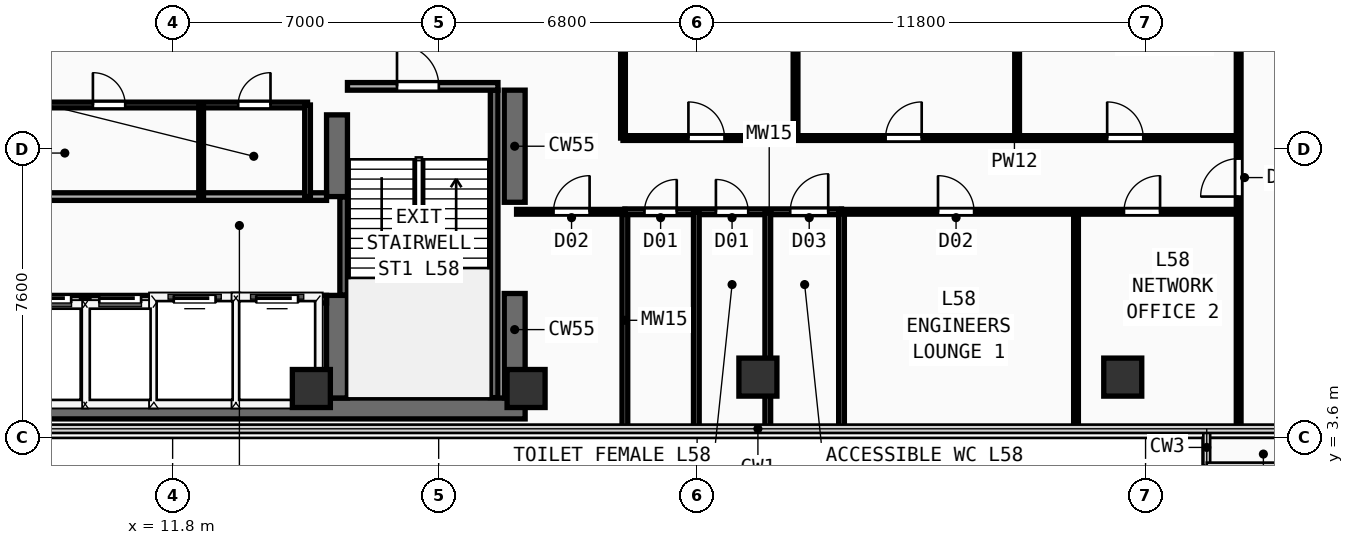
"""IFC4 building model, lengths in metres.
Left out: names, types, materials, properties, quantities, classifications, styles, units other than length and angle.
Written with IfcOpenShell. Run it as: python <this file> out.ifc"""

import sys

from ifc_helpers import new_model, si_unit, direction, frame, frame_2d, origin, origin_2d, place, context, subcontext, project, spatial, rectangle, extrude, element, fill, save


model = new_model("IFC4")
c1 = context("Model", 3, precision=1e-05, world=origin(), true_north=direction((0.0, 1.0)))
c2 = subcontext(c1, "Body", "Model", "MODEL_VIEW")
j1 = project(units=[si_unit("LENGTHUNIT", "METRE"), si_unit("PLANEANGLEUNIT", "RADIAN")], contexts=[c1])
p1 = place(None, origin())
s1 = spatial("IfcSite", under=j1, at=p1, CompositionType="ELEMENT")
p2 = place(p1, origin())
s2 = spatial("IfcBuilding", under=s1, at=p2, CompositionType="ELEMENT")
p3 = place(p2, frame((0.0, 0.0, 227.3)))
s3 = spatial("IfcBuildingStorey", under=s2, at=p3, CompositionType="ELEMENT", Elevation=227.3)
p4 = place(p3, frame((7.175, 4.375, 0.0), z_axis=(0.0, 0.0, 1.0), x_axis=(1.0, 0.0, 0.0)))
e1 = element("IfcWall", 1, at=p4, inside=s3, PredefinedType="SHEAR", context=c2, shape_type="SweptSolid", body=[
    extrude(rectangle(XDim=13.9, YDim=0.55, at=frame_2d((6.95, 0.0))), origin(), (0.0, 0.0, 1.0), 3.56),
])
p5 = place(p3, frame((20.8, 4.65, 0.0), z_axis=(0.0, 0.0, 1.0), x_axis=(0.0, 1.0, 0.0)))
e2 = element("IfcWall", 2, at=p5, inside=s3, PredefinedType="SHEAR", context=c2, shape_type="SweptSolid", body=[
    extrude(rectangle(XDim=2.75, YDim=0.55, at=frame_2d((1.375, 0.0))), origin(), (0.0, 0.0, 1.0), 3.56),
])
p6 = place(p3, frame((20.8, 9.8, 0.0), z_axis=(0.0, 0.0, 1.0), x_axis=(0.0, 1.0, 0.0)))
e3 = element("IfcWall", 3, at=p6, inside=s3, PredefinedType="SHEAR", context=c2, shape_type="SweptSolid", body=[
    extrude(rectangle(XDim=2.95, YDim=0.55, at=frame_2d((1.475, 0.0))), origin(), (0.0, 0.0, 1.0), 3.56),
])
p7 = place(p3, frame((16.125, 4.65, 0.0), z_axis=(0.0, 0.0, 1.0), x_axis=(0.0, 1.0, 0.0)))
e4 = element("IfcWall", 4, at=p7, inside=s3, PredefinedType="SHEAR", context=c2, shape_type="SweptSolid", body=[
    extrude(rectangle(XDim=2.7, YDim=0.55, at=frame_2d((1.35, 0.0))), origin(), (0.0, 0.0, 1.0), 3.56),
])
p8 = place(p3, frame((16.125, 9.95, 0.0), z_axis=(0.0, 0.0, 1.0), x_axis=(0.0, 1.0, 0.0)))
e5 = element("IfcWall", 5, at=p8, inside=s3, PredefinedType="SHEAR", context=c2, shape_type="SweptSolid", body=[
    extrude(rectangle(XDim=2.15, YDim=0.55, at=frame_2d((1.075, 0.0))), origin(), (0.0, 0.0, 1.0), 3.56),
])
for number, where, z_axis, x_axis in (
    (6, (15.45, 4.9, 0.0), (0.0, 0.0, 1.0), (1.0, 0.0, 0.0)),
    (7, (21.1, 4.9, 0.0), (0.0, 0.0, 1.0), (1.0, 0.0, 0.0)),
    (8, (27.2, 5.2, 0.0), (0.0, 0.0, 1.0), (1.0, 0.0, 0.0)),
    (9, (36.8, 5.2, 0.0), (0.0, 0.0, 1.0), (1.0, 0.0, 0.0)),
):
    element("IfcColumn", number, at=place(p3, frame(where, z_axis=z_axis, x_axis=x_axis)), inside=s3, PredefinedType="COLUMN", context=c2, shape_type="SweptSolid", body=[
        extrude(rectangle(XDim=1.0, YDim=1.0, at=origin_2d()), origin(), (0.0, 0.0, 1.0), 3.56),
    ])
p9 = place(p3, frame((16.3, 7.36, 0.0), z_axis=(0.0, 0.0, 1.0), x_axis=(0.0, 1.0, 0.0)))
e10 = element("IfcWall", 10, at=p9, inside=s3, PredefinedType="SHEAR", context=c2, shape_type="SweptSolid", body=[
    extrude(rectangle(XDim=2.58, YDim=0.2, at=frame_2d((1.29, 0.0))), origin(), (0.0, 0.0, 1.0), 3.56),
])
p10 = place(p3, frame((20.26, 4.66, 0.0), z_axis=(0.0, 0.0, 1.0), x_axis=(0.0, 1.0, 0.0)))
e11 = element("IfcWall", 11, at=p10, inside=s3, PredefinedType="SHEAR", context=c2, shape_type="SweptSolid", body=[
    extrude(rectangle(XDim=8.09, YDim=0.2, at=frame_2d((4.045, 0.0))), origin(), (0.0, 0.0, 1.0), 3.56),
])
p11 = place(p3, frame((16.4, 12.85, 0.0), z_axis=(0.0, 0.0, 1.0), x_axis=(1.0, 0.0, 0.0)))
e12 = element("IfcWall", 12, at=p11, inside=s3, PredefinedType="PARTITIONING", context=c2, shape_type="SweptSolid", body=[
    extrude(rectangle(XDim=3.96, YDim=0.2, at=frame_2d((1.98, 0.0))), origin(), (0.0, 0.0, 1.0), 3.56),
])
p12 = place(p11, frame((1.304, 0.0, 0.0)))
e13 = element("IfcOpeningElement", 13, at=p12, cuts=e12, PredefinedType="OPENING", context=c2, shape_type="SweptSolid", body=[
    extrude(rectangle(XDim=1.1, YDim=2.2, at=frame_2d((0.55, 1.1))), frame((0.0, 0.11, 0.0), z_axis=(0.0, -1.0, 0.0), x_axis=(1.0, 0.0, 0.0)), (0.0, 0.0, 1.0), 0.22),
])
p13 = place(p3, frame((7.5, 7.25, 0.0), z_axis=(0.0, 0.0, 1.0), x_axis=(1.0, 0.0, 0.0)))
e14 = element("IfcWall", 14, at=p13, inside=s3, PredefinedType="PARTITIONING", context=c2, shape_type="SweptSolid", body=[
    extrude(rectangle(XDim=8.35, YDim=0.2, at=frame_2d((4.175, 0.0))), origin(), (0.0, 0.0, 1.0), 3.56),
])
p14 = place(p13, frame((0.53, 0.0, 0.0)))
e15 = element("IfcOpeningElement", 15, at=p14, cuts=e14, PredefinedType="OPENING", context=c2, shape_type="SweptSolid", body=[
    extrude(rectangle(XDim=1.1, YDim=2.2, at=frame_2d((0.55, 1.1))), frame((0.0, 0.11, 0.0), z_axis=(0.0, -1.0, 0.0), x_axis=(1.0, 0.0, 0.0)), (0.0, 0.0, 1.0), 0.22),
])
p15 = place(p13, frame((2.37, 0.0, 0.0)))
e16 = element("IfcOpeningElement", 16, at=p15, cuts=e14, PredefinedType="OPENING", context=c2, shape_type="SweptSolid", body=[
    extrude(rectangle(XDim=1.1, YDim=2.2, at=frame_2d((0.55, 1.1))), frame((0.0, 0.11, 0.0), z_axis=(0.0, -1.0, 0.0), x_axis=(1.0, 0.0, 0.0)), (0.0, 0.0, 1.0), 0.22),
])
p16 = place(p13, frame((4.33, 0.0, 0.0)))
e17 = element("IfcOpeningElement", 17, at=p16, cuts=e14, PredefinedType="OPENING", context=c2, shape_type="SweptSolid", body=[
    extrude(rectangle(XDim=1.1, YDim=2.2, at=frame_2d((0.55, 1.1))), frame((0.0, 0.11, 0.0), z_axis=(0.0, -1.0, 0.0), x_axis=(1.0, 0.0, 0.0)), (0.0, 0.0, 1.0), 0.22),
])
p17 = place(p13, frame((6.5, 0.0, 0.0)))
e18 = element("IfcOpeningElement", 18, at=p17, cuts=e14, PredefinedType="OPENING", context=c2, shape_type="SweptSolid", body=[
    extrude(rectangle(XDim=1.1, YDim=2.2, at=frame_2d((0.55, 1.1))), frame((0.0, 0.11, 0.0), z_axis=(0.0, -1.0, 0.0), x_axis=(1.0, 0.0, 0.0)), (0.0, 0.0, 1.0), 0.22),
])
p18 = place(p3, frame((7.5, 9.95, 0.0), z_axis=(0.0, 0.0, 1.0), x_axis=(1.0, 0.0, 0.0)))
e19 = element("IfcWall", 19, at=p18, inside=s3, PredefinedType="PARTITIONING", context=c2, shape_type="SweptSolid", body=[
    extrude(rectangle(XDim=8.35, YDim=0.2, at=frame_2d((4.175, 0.0))), origin(), (0.0, 0.0, 1.0), 3.56),
])
for number, where, z_axis, x_axis in (
    (20, (9.5, 4.45, 0.0), (0.0, 0.0, 1.0), (0.0, 1.0, 0.0)),
    (21, (11.36, 4.45, 0.0), (0.0, 0.0, 1.0), (0.0, 1.0, 0.0)),
    (22, (13.46, 4.45, 0.0), (0.0, 0.0, 1.0), (0.0, 1.0, 0.0)),
):
    element("IfcWall", number, at=place(p3, frame(where, z_axis=z_axis, x_axis=x_axis)), inside=s3, PredefinedType="PARTITIONING", context=c2, shape_type="SweptSolid", body=[
        extrude(rectangle(XDim=2.8, YDim=0.2, at=frame_2d((1.4, 0.0))), origin(), (0.0, 0.0, 1.0), 3.56),
    ])
p19 = place(p3, frame((7.5, 12.36, 0.0), z_axis=(0.0, 0.0, 1.0), x_axis=(1.0, 0.0, 0.0)))
e23 = element("IfcWall", 23, at=p19, inside=s3, PredefinedType="PARTITIONING", context=c2, shape_type="SweptSolid", body=[
    extrude(rectangle(XDim=7.85, YDim=0.15, at=frame_2d((3.925, 0.0))), origin(), (0.0, 0.0, 1.0), 3.56),
])
p20 = place(p19, frame((2.202, 0.0, 0.0)))
e24 = element("IfcOpeningElement", 24, at=p20, cuts=e23, PredefinedType="OPENING", context=c2, shape_type="SweptSolid", body=[
    extrude(rectangle(XDim=0.85, YDim=2.15, at=frame_2d((0.425, 1.075))), frame((0.0, 0.085, 0.0), z_axis=(0.0, -1.0, 0.0), x_axis=(1.0, 0.0, 0.0)), (0.0, 0.0, 1.0), 0.17),
])
p21 = place(p19, frame((6.025, 0.0, 0.0)))
e25 = element("IfcOpeningElement", 25, at=p21, cuts=e23, PredefinedType="OPENING", context=c2, shape_type="SweptSolid", body=[
    extrude(rectangle(XDim=0.85, YDim=2.15, at=frame_2d((0.425, 1.075))), frame((0.0, 0.085, 0.0), z_axis=(0.0, -1.0, 0.0), x_axis=(1.0, 0.0, 0.0)), (0.0, 0.0, 1.0), 0.17),
])
p22 = place(p3, frame((15.35, 9.95, 0.0), z_axis=(0.0, 0.0, 1.0), x_axis=(0.0, 1.0, 0.0)))
e26 = element("IfcWall", 26, at=p22, inside=s3, PredefinedType="PARTITIONING", context=c2, shape_type="SweptSolid", body=[
    extrude(rectangle(XDim=2.41, YDim=0.15, at=frame_2d((1.205, 0.0))), origin(), (0.0, 0.0, 1.0), 3.56),
])
p23 = place(p3, frame((12.55, 9.95, 0.0), z_axis=(0.0, 0.0, 1.0), x_axis=(0.0, 1.0, 0.0)))
e27 = element("IfcWall", 27, at=p23, inside=s3, PredefinedType="PARTITIONING", context=c2, shape_type="SweptSolid", body=[
    extrude(rectangle(XDim=2.41, YDim=0.125, at=frame_2d((1.205, 0.0))), origin(), (0.0, 0.0, 1.0), 3.56),
])
p24 = place(p3, frame((23.7, 3.84, 0.0), z_axis=(0.0, 0.0, 1.0), x_axis=(0.0, 1.0, 0.0)))
e28 = element("IfcWall", 28, at=p24, inside=s3, PredefinedType="PLUMBINGWALL", context=c2, shape_type="SweptSolid", body=[
    extrude(rectangle(XDim=5.71, YDim=0.15, at=frame_2d((2.855, 0.0))), origin(), (0.0, 0.0, 1.0), 3.56),
])
p25 = place(p3, frame((23.7, 9.55, 0.0), z_axis=(0.0, 0.0, 1.0), x_axis=(1.0, 0.0, 0.0)))
e29 = element("IfcWall", 29, at=p25, inside=s3, PredefinedType="PLUMBINGWALL", context=c2, shape_type="SweptSolid", body=[
    extrude(rectangle(XDim=5.7, YDim=0.15, at=frame_2d((2.85, 0.0))), origin(), (0.0, 0.0, 1.0), 3.2),
])
p26 = place(p25, frame((0.515, 0.0, 0.0)))
e30 = element("IfcOpeningElement", 30, at=p26, cuts=e29, PredefinedType="OPENING", context=c2, shape_type="SweptSolid", body=[
    extrude(rectangle(XDim=0.85, YDim=2.15, at=frame_2d((0.425, 1.075))), frame((0.0, 0.085, 0.0), z_axis=(0.0, -1.0, 0.0), x_axis=(1.0, 0.0, 0.0)), (0.0, 0.0, 1.0), 0.17),
])
p27 = place(p25, frame((2.395, 0.0, 0.0)))
e31 = element("IfcOpeningElement", 31, at=p27, cuts=e29, PredefinedType="OPENING", context=c2, shape_type="SweptSolid", body=[
    extrude(rectangle(XDim=0.85, YDim=2.15, at=frame_2d((0.425, 1.075))), frame((0.0, 0.085, 0.0), z_axis=(0.0, -1.0, 0.0), x_axis=(1.0, 0.0, 0.0)), (0.0, 0.0, 1.0), 0.17),
])
p28 = place(p25, frame((4.35, 0.0, 0.0)))
e32 = element("IfcOpeningElement", 32, at=p28, cuts=e29, PredefinedType="OPENING", context=c2, shape_type="SweptSolid", body=[
    extrude(rectangle(XDim=1.0, YDim=2.2, at=frame_2d((0.5, 1.1))), frame((0.0, 0.085, 0.0), z_axis=(0.0, -1.0, 0.0), x_axis=(1.0, 0.0, 0.0)), (0.0, 0.0, 1.0), 0.17),
])
p29 = place(p3, frame((25.58, 3.84, 0.0), z_axis=(0.0, 0.0, 1.0), x_axis=(0.0, 1.0, 0.0)))
e33 = element("IfcWall", 33, at=p29, inside=s3, PredefinedType="PLUMBINGWALL", context=c2, shape_type="SweptSolid", body=[
    extrude(rectangle(XDim=5.71, YDim=0.15, at=frame_2d((2.855, 0.0))), origin(), (0.0, 0.0, 1.0), 3.56),
])
p30 = place(p3, frame((27.46, 3.84, 0.0), z_axis=(0.0, 0.0, 1.0), x_axis=(0.0, 1.0, 0.0)))
e34 = element("IfcWall", 34, at=p30, inside=s3, PredefinedType="PLUMBINGWALL", context=c2, shape_type="SweptSolid", body=[
    extrude(rectangle(XDim=5.71, YDim=0.15, at=frame_2d((2.855, 0.0))), origin(), (0.0, 0.0, 1.0), 3.16),
])
p31 = place(p3, frame((29.4, 3.84, 0.0), z_axis=(0.0, 0.0, 1.0), x_axis=(0.0, 1.0, 0.0)))
e35 = element("IfcWall", 35, at=p31, inside=s3, PredefinedType="PLUMBINGWALL", context=c2, shape_type="SweptSolid", body=[
    extrude(rectangle(XDim=5.71, YDim=0.15, at=frame_2d((2.855, 0.0))), origin(), (0.0, 0.0, 1.0), 3.56),
])
p32 = place(p3, frame((20.85, 9.55, 0.0), z_axis=(0.0, 0.0, 1.0), x_axis=(1.0, 0.0, 0.0)))
e36 = element("IfcWall", 36, at=p32, inside=s3, PredefinedType="PARTITIONING", context=c2, shape_type="SweptSolid", body=[
    extrude(rectangle(XDim=2.85, YDim=0.125, at=frame_2d((1.425, 0.0))), origin(), (0.0, 0.0, 1.0), 3.2),
])
p33 = place(p32, frame((0.971, 0.0, 0.0)))
e37 = element("IfcOpeningElement", 37, at=p33, cuts=e36, PredefinedType="OPENING", context=c2, shape_type="SweptSolid", body=[
    extrude(rectangle(XDim=0.95, YDim=2.15, at=frame_2d((0.475, 1.075))), frame((0.0, 0.073, 0.0), z_axis=(0.0, -1.0, 0.0), x_axis=(1.0, 0.0, 0.0)), (0.0, 0.0, 1.0), 0.145),
])
p34 = place(p3, frame((29.4, 9.55, 0.0), z_axis=(0.0, 0.0, 1.0), x_axis=(1.0, 0.0, 0.0)))
e38 = element("IfcWall", 38, at=p34, inside=s3, PredefinedType="PARTITIONING", context=c2, shape_type="SweptSolid", body=[
    extrude(rectangle(XDim=10.45, YDim=0.125, at=frame_2d((5.225, 0.0))), origin(), (0.0, 0.0, 1.0), 3.2),
])
p35 = place(p34, frame((2.539, 0.0, 0.0)))
e39 = element("IfcOpeningElement", 39, at=p35, cuts=e38, PredefinedType="OPENING", context=c2, shape_type="SweptSolid", body=[
    extrude(rectangle(XDim=0.95, YDim=2.15, at=frame_2d((0.475, 1.075))), frame((0.0, 0.073, 0.0), z_axis=(0.0, -1.0, 0.0), x_axis=(1.0, 0.0, 0.0)), (0.0, 0.0, 1.0), 0.145),
])
p36 = place(p34, frame((7.432, 0.0, 0.0)))
e40 = element("IfcOpeningElement", 40, at=p36, cuts=e38, PredefinedType="OPENING", context=c2, shape_type="SweptSolid", body=[
    extrude(rectangle(XDim=0.95, YDim=2.15, at=frame_2d((0.475, 1.075))), frame((0.0, 0.073, 0.0), z_axis=(0.0, -1.0, 0.0), x_axis=(1.0, 0.0, 0.0)), (0.0, 0.0, 1.0), 0.145),
])
p37 = place(p3, frame((35.57, 3.84, 0.0), z_axis=(0.0, 0.0, 1.0), x_axis=(0.0, 1.0, 0.0)))
e41 = element("IfcWall", 41, at=p37, inside=s3, PredefinedType="PARTITIONING", context=c2, shape_type="SweptSolid", body=[
    extrude(rectangle(XDim=5.71, YDim=0.125, at=frame_2d((2.855, 0.0))), origin(), (0.0, 0.0, 1.0), 3.56),
])
p38 = place(p3, frame((39.85, 3.84, 0.0), z_axis=(0.0, 0.0, 1.0), x_axis=(0.0, 1.0, 0.0)))
e42 = element("IfcWall", 42, at=p38, inside=s3, PredefinedType="PARTITIONING", context=c2, shape_type="SweptSolid", body=[
    extrude(rectangle(XDim=15.92, YDim=0.125, at=frame_2d((7.96, 0.0))), origin(), (0.0, 0.0, 1.0), 3.56),
])
p39 = place(p38, frame((6.11, 0.0, 0.0)))
e43 = element("IfcOpeningElement", 43, at=p39, cuts=e42, PredefinedType="OPENING", context=c2, shape_type="SweptSolid", body=[
    extrude(rectangle(XDim=1.0, YDim=2.2, at=frame_2d((0.5, 1.1))), frame((0.0, 0.073, 0.0), z_axis=(0.0, -1.0, 0.0), x_axis=(1.0, 0.0, 0.0)), (0.0, 0.0, 1.0), 0.145),
])
p40 = place(p3, frame((23.65, 11.49, 0.0), z_axis=(0.0, 0.0, 1.0), x_axis=(0.0, 1.0, 0.0)))
e44 = element("IfcWall", 44, at=p40, inside=s3, PredefinedType="PARTITIONING", context=c2, shape_type="SweptSolid", body=[
    extrude(rectangle(XDim=12.42, YDim=0.125, at=frame_2d((6.21, 0.0))), origin(), (0.0, 0.0, 1.0), 3.56),
])
p41 = place(p3, frame((23.65, 11.49, 0.0), z_axis=(0.0, 0.0, 1.0), x_axis=(1.0, 0.0, 0.0)))
e45 = element("IfcWall", 45, at=p41, inside=s3, PredefinedType="PARTITIONING", context=c2, shape_type="SweptSolid", body=[
    extrude(rectangle(XDim=16.2, YDim=0.125, at=frame_2d((8.1, 0.0))), origin(), (0.0, 0.0, 1.0), 3.56),
])
p42 = place(p41, frame((1.722, 0.0, 0.0)))
e46 = element("IfcOpeningElement", 46, at=p42, cuts=e45, PredefinedType="OPENING", context=c2, shape_type="SweptSolid", body=[
    extrude(rectangle(XDim=0.95, YDim=2.15, at=frame_2d((0.475, 1.075))), frame((0.0, 0.073, 0.0), z_axis=(0.0, -1.0, 0.0), x_axis=(1.0, 0.0, 0.0)), (0.0, 0.0, 1.0), 0.145),
])
p43 = place(p41, frame((6.91, 0.0, 0.0)))
e47 = element("IfcOpeningElement", 47, at=p43, cuts=e45, PredefinedType="OPENING", context=c2, shape_type="SweptSolid", body=[
    extrude(rectangle(XDim=0.95, YDim=2.15, at=frame_2d((0.475, 1.075))), frame((0.0, 0.073, 0.0), z_axis=(0.0, -1.0, 0.0), x_axis=(1.0, 0.0, 0.0)), (0.0, 0.0, 1.0), 0.145),
])
p44 = place(p41, frame((12.74, 0.0, 0.0)))
e48 = element("IfcOpeningElement", 48, at=p44, cuts=e45, PredefinedType="OPENING", context=c2, shape_type="SweptSolid", body=[
    extrude(rectangle(XDim=0.95, YDim=2.15, at=frame_2d((0.475, 1.075))), frame((0.0, 0.073, 0.0), z_axis=(0.0, -1.0, 0.0), x_axis=(1.0, 0.0, 0.0)), (0.0, 0.0, 1.0), 0.145),
])
for number, where, z_axis, x_axis in (
    (49, (28.19, 11.49, 0.0), (0.0, 0.0, 1.0), (0.0, 1.0, 0.0)),
    (50, (34.02, 11.49, 0.0), (0.0, 0.0, 1.0), (0.0, 1.0, 0.0)),
):
    element("IfcWall", number, at=place(p3, frame(where, z_axis=z_axis, x_axis=x_axis)), inside=s3, PredefinedType="PARTITIONING", context=c2, shape_type="SweptSolid", body=[
        extrude(rectangle(XDim=8.27, YDim=0.125, at=frame_2d((4.135, 0.0))), origin(), (0.0, 0.0, 1.0), 3.56),
    ])
p45 = place(p12, frame((1.1, 0.0, 0.0), z_axis=(0.0, 0.0, 1.0), x_axis=(-1.0, 0.0, 0.0)))
e51 = element("IfcDoor", 51, at=p45, inside=s3, OperationType="SINGLE_SWING_RIGHT", PredefinedType="DOOR", context=c2, shape_type="SweptSolid", body=[
    extrude(rectangle(XDim=1.1, YDim=2.2, at=frame_2d((0.55, 1.1))), frame((0.0, 0.025, 0.0), z_axis=(0.0, -1.0, 0.0), x_axis=(1.0, 0.0, 0.0)), (0.0, 0.0, 1.0), 0.05),
])
fill(e13, e51)
p46 = place(p14, origin())
e52 = element("IfcDoor", 52, at=p46, inside=s3, OperationType="SLIDING_TO_LEFT", PredefinedType="DOOR", context=c2, shape_type="SweptSolid", body=[
    extrude(rectangle(XDim=1.1, YDim=2.2, at=frame_2d((0.55, 1.1))), frame((0.0, 0.025, 0.0), z_axis=(0.0, -1.0, 0.0), x_axis=(1.0, 0.0, 0.0)), (0.0, 0.0, 1.0), 0.05),
])
fill(e15, e52)
p47 = place(p15, origin())
e53 = element("IfcDoor", 53, at=p47, inside=s3, OperationType="SLIDING_TO_LEFT", PredefinedType="DOOR", context=c2, shape_type="SweptSolid", body=[
    extrude(rectangle(XDim=1.1, YDim=2.2, at=frame_2d((0.55, 1.1))), frame((0.0, 0.025, 0.0), z_axis=(0.0, -1.0, 0.0), x_axis=(1.0, 0.0, 0.0)), (0.0, 0.0, 1.0), 0.05),
])
fill(e16, e53)
p48 = place(p16, origin())
e54 = element("IfcDoor", 54, at=p48, inside=s3, OperationType="SLIDING_TO_LEFT", PredefinedType="DOOR", context=c2, shape_type="SweptSolid", body=[
    extrude(rectangle(XDim=1.1, YDim=2.2, at=frame_2d((0.55, 1.1))), frame((0.0, 0.025, 0.0), z_axis=(0.0, -1.0, 0.0), x_axis=(1.0, 0.0, 0.0)), (0.0, 0.0, 1.0), 0.05),
])
fill(e17, e54)
p49 = place(p17, origin())
e55 = element("IfcDoor", 55, at=p49, inside=s3, OperationType="SLIDING_TO_LEFT", PredefinedType="DOOR", context=c2, shape_type="SweptSolid", body=[
    extrude(rectangle(XDim=1.1, YDim=2.2, at=frame_2d((0.55, 1.1))), frame((0.0, 0.025, 0.0), z_axis=(0.0, -1.0, 0.0), x_axis=(1.0, 0.0, 0.0)), (0.0, 0.0, 1.0), 0.05),
])
fill(e18, e55)
p50 = place(p20, origin())
e56 = element("IfcDoor", 56, at=p50, inside=s3, OperationType="SINGLE_SWING_LEFT", PredefinedType="DOOR", context=c2, shape_type="SweptSolid", body=[
    extrude(rectangle(XDim=0.85, YDim=2.15, at=frame_2d((0.425, 1.075))), frame((0.0, 0.025, 0.0), z_axis=(0.0, -1.0, 0.0), x_axis=(1.0, 0.0, 0.0)), (0.0, 0.0, 1.0), 0.05),
])
fill(e24, e56)
p51 = place(p21, origin())
e57 = element("IfcDoor", 57, at=p51, inside=s3, OperationType="SINGLE_SWING_RIGHT", PredefinedType="DOOR", context=c2, shape_type="SweptSolid", body=[
    extrude(rectangle(XDim=0.85, YDim=2.15, at=frame_2d((0.425, 1.075))), frame((0.0, 0.025, 0.0), z_axis=(0.0, -1.0, 0.0), x_axis=(1.0, 0.0, 0.0)), (0.0, 0.0, 1.0), 0.05),
])
fill(e25, e57)
p52 = place(p26, origin())
e58 = element("IfcDoor", 58, at=p52, inside=s3, OperationType="SINGLE_SWING_RIGHT", PredefinedType="DOOR", context=c2, shape_type="SweptSolid", body=[
    extrude(rectangle(XDim=0.85, YDim=2.15, at=frame_2d((0.425, 1.075))), frame((0.0, 0.025, 0.0), z_axis=(0.0, -1.0, 0.0), x_axis=(1.0, 0.0, 0.0)), (0.0, 0.0, 1.0), 0.05),
])
fill(e30, e58)
p53 = place(p27, origin())
e59 = element("IfcDoor", 59, at=p53, inside=s3, OperationType="SINGLE_SWING_LEFT", PredefinedType="DOOR", context=c2, shape_type="SweptSolid", body=[
    extrude(rectangle(XDim=0.85, YDim=2.15, at=frame_2d((0.425, 1.075))), frame((0.0, 0.025, 0.0), z_axis=(0.0, -1.0, 0.0), x_axis=(1.0, 0.0, 0.0)), (0.0, 0.0, 1.0), 0.05),
])
fill(e31, e59)
p54 = place(p28, origin())
e60 = element("IfcDoor", 60, at=p54, inside=s3, OperationType="SINGLE_SWING_RIGHT", PredefinedType="DOOR", context=c2, shape_type="SweptSolid", body=[
    extrude(rectangle(XDim=1.0, YDim=2.2, at=frame_2d((0.5, 1.1))), frame((0.0, 0.025, 0.0), z_axis=(0.0, -1.0, 0.0), x_axis=(1.0, 0.0, 0.0)), (0.0, 0.0, 1.0), 0.05),
])
fill(e32, e60)
p55 = place(p33, origin())
e61 = element("IfcDoor", 61, at=p55, inside=s3, OperationType="SINGLE_SWING_RIGHT", PredefinedType="DOOR", context=c2, shape_type="SweptSolid", body=[
    extrude(rectangle(XDim=0.95, YDim=2.15, at=frame_2d((0.475, 1.075))), frame((0.0, 0.025, 0.0), z_axis=(0.0, -1.0, 0.0), x_axis=(1.0, 0.0, 0.0)), (0.0, 0.0, 1.0), 0.05),
])
fill(e37, e61)
p56 = place(p35, origin())
e62 = element("IfcDoor", 62, at=p56, inside=s3, OperationType="SINGLE_SWING_LEFT", PredefinedType="DOOR", context=c2, shape_type="SweptSolid", body=[
    extrude(rectangle(XDim=0.95, YDim=2.15, at=frame_2d((0.475, 1.075))), frame((0.0, 0.025, 0.0), z_axis=(0.0, -1.0, 0.0), x_axis=(1.0, 0.0, 0.0)), (0.0, 0.0, 1.0), 0.05),
])
fill(e39, e62)
p57 = place(p36, origin())
e63 = element("IfcDoor", 63, at=p57, inside=s3, OperationType="SINGLE_SWING_RIGHT", PredefinedType="DOOR", context=c2, shape_type="SweptSolid", body=[
    extrude(rectangle(XDim=0.95, YDim=2.15, at=frame_2d((0.475, 1.075))), frame((0.0, 0.025, 0.0), z_axis=(0.0, -1.0, 0.0), x_axis=(1.0, 0.0, 0.0)), (0.0, 0.0, 1.0), 0.05),
])
fill(e40, e63)
p58 = place(p39, origin())
e64 = element("IfcDoor", 64, at=p58, inside=s3, OperationType="SINGLE_SWING_LEFT", PredefinedType="DOOR", context=c2, shape_type="SweptSolid", body=[
    extrude(rectangle(XDim=1.0, YDim=2.2, at=frame_2d((0.5, 1.1))), frame((0.0, 0.025, 0.0), z_axis=(0.0, -1.0, 0.0), x_axis=(1.0, 0.0, 0.0)), (0.0, 0.0, 1.0), 0.05),
])
fill(e43, e64)
p59 = place(p42, origin())
e65 = element("IfcDoor", 65, at=p59, inside=s3, OperationType="SINGLE_SWING_LEFT", PredefinedType="DOOR", context=c2, shape_type="SweptSolid", body=[
    extrude(rectangle(XDim=0.95, YDim=2.15, at=frame_2d((0.475, 1.075))), frame((0.0, 0.025, 0.0), z_axis=(0.0, -1.0, 0.0), x_axis=(1.0, 0.0, 0.0)), (0.0, 0.0, 1.0), 0.05),
])
fill(e46, e65)
p60 = place(p43, origin())
e66 = element("IfcDoor", 66, at=p60, inside=s3, OperationType="SINGLE_SWING_RIGHT", PredefinedType="DOOR", context=c2, shape_type="SweptSolid", body=[
    extrude(rectangle(XDim=0.95, YDim=2.15, at=frame_2d((0.475, 1.075))), frame((0.0, 0.025, 0.0), z_axis=(0.0, -1.0, 0.0), x_axis=(1.0, 0.0, 0.0)), (0.0, 0.0, 1.0), 0.05),
])
fill(e47, e66)
p61 = place(p44, origin())
e67 = element("IfcDoor", 67, at=p61, inside=s3, OperationType="SINGLE_SWING_LEFT", PredefinedType="DOOR", context=c2, shape_type="SweptSolid", body=[
    extrude(rectangle(XDim=0.95, YDim=2.15, at=frame_2d((0.475, 1.075))), frame((0.0, 0.025, 0.0), z_axis=(0.0, -1.0, 0.0), x_axis=(1.0, 0.0, 0.0)), (0.0, 0.0, 1.0), 0.05),
])
fill(e48, e67)
save(model, sys.argv[1])
